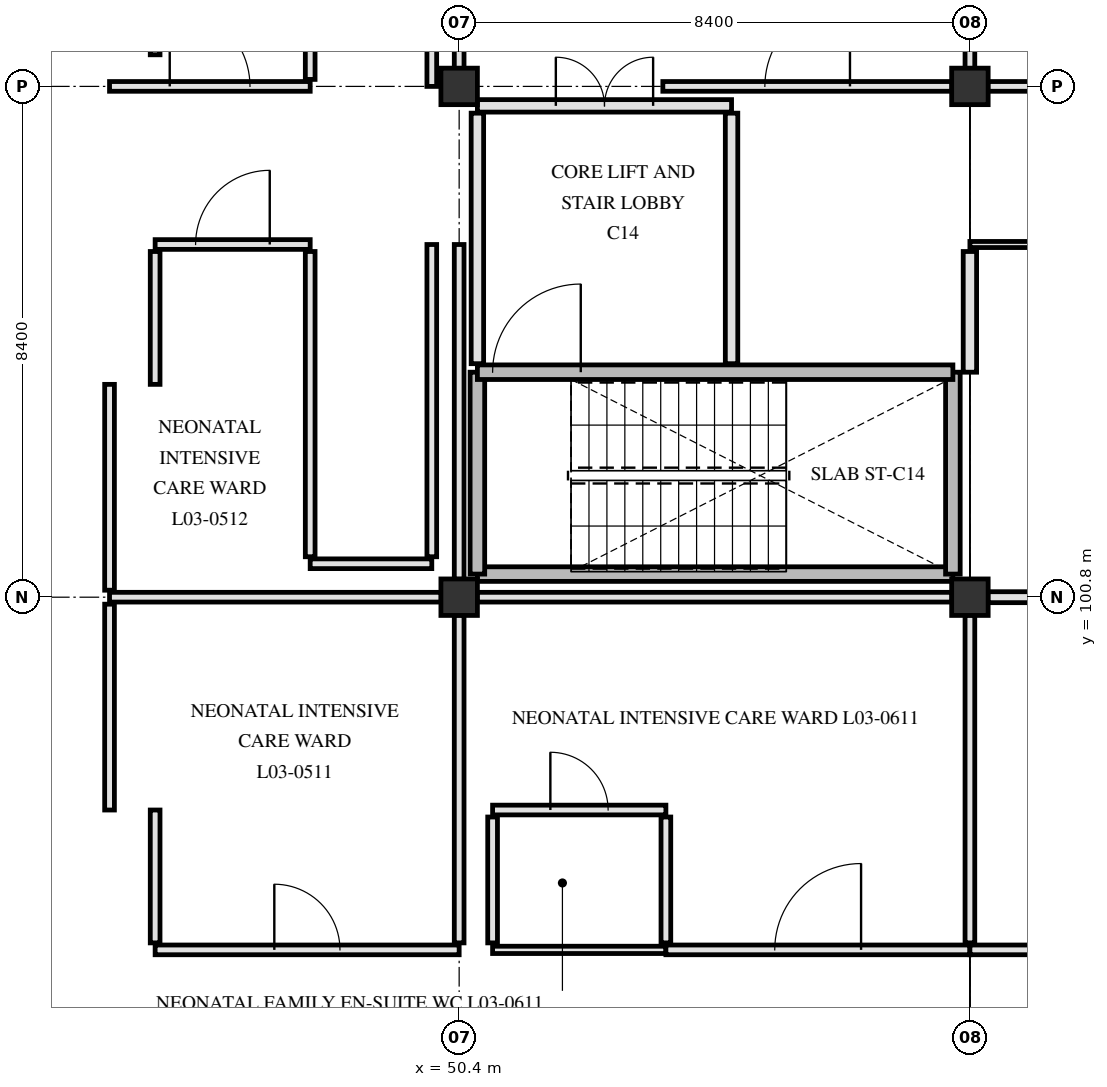
"""IFC4 building model, lengths in metres.
Left out: names, types, materials, properties, quantities, classifications, styles, units other than length and angle.
Written with IfcOpenShell. Run it as: python <this file> out.ifc"""

import sys

from ifc_helpers import new_model, si_unit, direction, frame, frame_2d, origin, origin_2d, place, context, subcontext, project, spatial, rectangle, extrude, element, fill, save


model = new_model("IFC4")
c1 = context("Model", 3, precision=1e-05, world=origin(), true_north=direction((0.0, 1.0)))
c2 = subcontext(c1, "Body", "Model", "MODEL_VIEW")
j1 = project(units=[si_unit("LENGTHUNIT", "METRE"), si_unit("PLANEANGLEUNIT", "RADIAN")], contexts=[c1])
p1 = place(None, origin())
s1 = spatial("IfcSite", under=j1, at=p1, CompositionType="ELEMENT")
p2 = place(p1, origin())
s2 = spatial("IfcBuilding", under=s1, at=p2, CompositionType="ELEMENT")
p3 = place(p2, frame((0.0, 0.0, 14.4)))
s3 = spatial("IfcBuildingStorey", under=s2, at=p3, CompositionType="ELEMENT", Elevation=14.4)
for number, where, z_axis, x_axis in (
    (1, (50.4, 100.8, 0.0), (0.0, 0.0, 1.0), (1.0, 0.0, 0.0)),
    (2, (50.4, 109.2, 0.0), (0.0, 0.0, 1.0), (1.0, 0.0, 0.0)),
    (3, (58.8, 100.8, 0.0), (0.0, 0.0, 1.0), (1.0, 0.0, 0.0)),
    (4, (58.8, 109.2, 0.0), (0.0, 0.0, 1.0), (1.0, 0.0, 0.0)),
):
    element("IfcColumn", number, at=place(p3, frame(where, z_axis=z_axis, x_axis=x_axis)), inside=s3, PredefinedType="COLUMN", context=c2, shape_type="SweptSolid", body=[
        extrude(rectangle(XDim=0.6, YDim=0.6, at=origin_2d()), origin(), (0.0, 0.0, 1.0), 4.2),
    ])
p4 = place(p3, frame((50.7, 101.18, 0.0), z_axis=(0.0, 0.0, 1.0), x_axis=(1.0, 0.0, 0.0)))
e5 = element("IfcWall", 5, at=p4, inside=s3, PredefinedType="SHEAR", context=c2, shape_type="SweptSolid", body=[
    extrude(rectangle(XDim=7.82, YDim=0.24, at=frame_2d((3.91, 0.0))), origin(), (0.0, 0.0, 1.0), 3.9),
])
for number, where, z_axis, x_axis in (
    (6, (50.7, 101.18, 0.0), (0.0, 0.0, 1.0), (0.0, 1.0, 0.0)),
    (7, (58.52, 101.18, 0.0), (0.0, 0.0, 1.0), (0.0, 1.0, 0.0)),
):
    element("IfcWall", number, at=place(p3, frame(where, z_axis=z_axis, x_axis=x_axis)), inside=s3, PredefinedType="SHEAR", context=c2, shape_type="SweptSolid", body=[
        extrude(rectangle(XDim=3.32, YDim=0.24, at=frame_2d((1.66, 0.0))), origin(), (0.0, 0.0, 1.0), 3.9),
    ])
p5 = place(p3, frame((50.7, 104.5, 0.0), z_axis=(0.0, 0.0, 1.0), x_axis=(1.0, 0.0, 0.0)))
e8 = element("IfcWall", 8, at=p5, inside=s3, PredefinedType="SHEAR", context=c2, shape_type="SweptSolid", body=[
    extrude(rectangle(XDim=7.82, YDim=0.24, at=frame_2d((3.91, 0.0))), origin(), (0.0, 0.0, 1.0), 3.9),
])
p6 = place(p5, frame((0.25, 0.0, 0.0)))
e9 = element("IfcOpeningElement", 9, at=p6, cuts=e8, PredefinedType="OPENING", context=c2, shape_type="SweptSolid", body=[
    extrude(rectangle(XDim=1.45, YDim=2.2, at=frame_2d((0.725, 1.1))), frame((0.0, 0.13, 0.0), z_axis=(0.0, -1.0, 0.0), x_axis=(1.0, 0.0, 0.0)), (0.0, 0.0, 1.0), 0.26),
])
p7 = place(p3, frame((54.88, 104.64, 0.0), z_axis=(0.0, 0.0, 1.0), x_axis=(0.0, 1.0, 0.0)))
e10 = element("IfcWall", 10, at=p7, inside=s3, PredefinedType="PARTITIONING", context=c2, shape_type="SweptSolid", body=[
    extrude(rectangle(XDim=4.12, YDim=0.205, at=frame_2d((2.06, 0.0))), origin(), (0.0, 0.0, 1.0), 3.89),
])
p8 = place(p3, frame((50.7, 104.64, 0.0), z_axis=(0.0, 0.0, 1.0), x_axis=(0.0, 1.0, 0.0)))
e11 = element("IfcWall", 11, at=p8, inside=s3, PredefinedType="PARTITIONING", context=c2, shape_type="SweptSolid", body=[
    extrude(rectangle(XDim=4.12, YDim=0.205, at=frame_2d((2.06, 0.0))), origin(), (0.0, 0.0, 1.0), 2.89),
])
p9 = place(p3, frame((50.7, 108.88, 0.0), z_axis=(0.0, 0.0, 1.0), x_axis=(1.0, 0.0, 0.0)))
e12 = element("IfcWall", 12, at=p9, inside=s3, PredefinedType="PARTITIONING", context=c2, shape_type="SweptSolid", body=[
    extrude(rectangle(XDim=4.18, YDim=0.205, at=frame_2d((2.09, 0.0))), origin(), (0.0, 0.0, 1.0), 2.89),
])
p10 = place(p9, frame((1.29, 0.0, 0.0)))
e13 = element("IfcOpeningElement", 13, at=p10, cuts=e12, PredefinedType="OPENING", context=c2, shape_type="SweptSolid", body=[
    extrude(rectangle(XDim=1.6, YDim=2.25, at=frame_2d((0.8, 1.125))), frame((0.0, 0.113, 0.0), z_axis=(0.0, -1.0, 0.0), x_axis=(1.0, 0.0, 0.0)), (0.0, 0.0, 1.0), 0.225),
])
p11 = place(p3, frame((45.4, 95.0, 0.0), z_axis=(0.0, 0.0, 1.0), x_axis=(1.0, 0.0, 0.0)))
e14 = element("IfcWall", 14, at=p11, inside=s3, PredefinedType="PARTITIONING", context=c2, shape_type="SweptSolid", body=[
    extrude(rectangle(XDim=5.0, YDim=0.16, at=frame_2d((2.5, 0.0))), origin(), (0.0, 0.0, 1.0), 2.89),
])
p12 = place(p11, frame((1.96, 0.0, 0.0)))
e15 = element("IfcOpeningElement", 15, at=p12, cuts=e14, PredefinedType="OPENING", context=c2, shape_type="SweptSolid", body=[
    extrude(rectangle(XDim=1.08, YDim=2.12, at=frame_2d((0.54, 1.06))), frame((0.0, 0.09, 0.0), z_axis=(0.0, -1.0, 0.0), x_axis=(1.0, 0.0, 0.0)), (0.0, 0.0, 1.0), 0.18),
])
p13 = place(p3, frame((50.95, 95.0, 0.0), z_axis=(0.0, 0.0, 1.0), x_axis=(1.0, 0.0, 0.0)))
e16 = element("IfcWall", 16, at=p13, inside=s3, PredefinedType="PARTITIONING", context=c2, shape_type="SweptSolid", body=[
    extrude(rectangle(XDim=2.85, YDim=0.12, at=frame_2d((1.425, 0.0))), origin(), (0.0, 0.0, 1.0), 3.89),
])
p14 = place(p3, frame((53.8, 95.0, 0.0), z_axis=(0.0, 0.0, 1.0), x_axis=(1.0, 0.0, 0.0)))
e17 = element("IfcWall", 17, at=p14, inside=s3, PredefinedType="PARTITIONING", context=c2, shape_type="SweptSolid", body=[
    extrude(rectangle(XDim=5.0, YDim=0.16, at=frame_2d((2.5, 0.0))), origin(), (0.0, 0.0, 1.0), 3.34),
])
p15 = place(p14, frame((1.79, 0.0, 0.0)))
e18 = element("IfcOpeningElement", 18, at=p15, cuts=e17, PredefinedType="OPENING", context=c2, shape_type="SweptSolid", body=[
    extrude(rectangle(XDim=1.42, YDim=2.22, at=frame_2d((0.71, 1.11))), frame((0.0, 0.09, 0.0), z_axis=(0.0, -1.0, 0.0), x_axis=(1.0, 0.0, 0.0)), (0.0, 0.0, 1.0), 0.18),
])
p16 = place(p3, frame((58.8, 95.0, 0.0), z_axis=(0.0, 0.0, 1.0), x_axis=(1.0, 0.0, 0.0)))
e19 = element("IfcWall", 19, at=p16, inside=s3, PredefinedType="PARTITIONING", context=c2, shape_type="SweptSolid", body=[
    extrude(rectangle(XDim=8.4, YDim=0.16, at=frame_2d((4.2, 0.0))), origin(), (0.0, 0.0, 1.0), 3.34),
])
p17 = place(p16, frame((3.25, 0.0, 0.0)))
e20 = element("IfcOpeningElement", 20, at=p17, cuts=e19, PredefinedType="OPENING", context=c2, shape_type="SweptSolid", body=[
    extrude(rectangle(XDim=1.9, YDim=2.3, at=frame_2d((0.95, 1.15))), frame((0.0, 0.09, 0.0), z_axis=(0.0, -1.0, 0.0), x_axis=(1.0, 0.0, 0.0)), (0.0, 0.0, 1.0), 0.18),
])
p18 = place(p3, frame((50.95, 97.3, 0.0), z_axis=(0.0, 0.0, 1.0), x_axis=(1.0, 0.0, 0.0)))
e21 = element("IfcWall", 21, at=p18, inside=s3, PredefinedType="PARTITIONING", context=c2, shape_type="SweptSolid", body=[
    extrude(rectangle(XDim=2.85, YDim=0.16, at=frame_2d((1.425, 0.0))), origin(), (0.0, 0.0, 1.0), 3.89),
])
p19 = place(p18, frame((0.95, 0.0, 0.0)))
e22 = element("IfcOpeningElement", 22, at=p19, cuts=e21, PredefinedType="OPENING", context=c2, shape_type="SweptSolid", body=[
    extrude(rectangle(XDim=0.95, YDim=2.1, at=frame_2d((0.475, 1.05))), frame((0.0, 0.09, 0.0), z_axis=(0.0, -1.0, 0.0), x_axis=(1.0, 0.0, 0.0)), (0.0, 0.0, 1.0), 0.18),
])
p20 = place(p3, frame((44.65, 100.8, 0.0), z_axis=(0.0, 0.0, 1.0), x_axis=(1.0, 0.0, 0.0)))
e23 = element("IfcWall", 23, at=p20, inside=s3, PredefinedType="PARTITIONING", context=c2, shape_type="SweptSolid", body=[
    extrude(rectangle(XDim=5.455, YDim=0.16, at=frame_2d((2.728, 0.0))), origin(), (0.0, 0.0, 1.0), 3.29),
])
p21 = place(p3, frame((50.695, 100.8, 0.0), z_axis=(0.0, 0.0, 1.0), x_axis=(1.0, 0.0, 0.0)))
e24 = element("IfcWall", 24, at=p21, inside=s3, PredefinedType="PARTITIONING", context=c2, shape_type="SweptSolid", body=[
    extrude(rectangle(XDim=7.81, YDim=0.16, at=frame_2d((3.905, 0.0))), origin(), (0.0, 0.0, 1.0), 3.29),
])
p22 = place(p3, frame((59.095, 100.8, 0.0), z_axis=(0.0, 0.0, 1.0), x_axis=(1.0, 0.0, 0.0)))
e25 = element("IfcWall", 25, at=p22, inside=s3, PredefinedType="PARTITIONING", context=c2, shape_type="SweptSolid", body=[
    extrude(rectangle(XDim=7.76, YDim=0.18, at=frame_2d((3.88, 0.0))), origin(), (0.0, 0.0, 1.0), 3.29),
])
p23 = place(p3, frame((47.95, 101.35, 0.0), z_axis=(0.0, 0.0, 1.0), x_axis=(1.0, 0.0, 0.0)))
e26 = element("IfcWall", 26, at=p23, inside=s3, PredefinedType="PARTITIONING", context=c2, shape_type="SweptSolid", body=[
    extrude(rectangle(XDim=2.0, YDim=0.16, at=frame_2d((1.0, 0.0))), origin(), (0.0, 0.0, 1.0), 3.89),
])
p24 = place(p3, frame((45.4, 106.6, 0.0), z_axis=(0.0, 0.0, 1.0), x_axis=(1.0, 0.0, 0.0)))
e27 = element("IfcWall", 27, at=p24, inside=s3, PredefinedType="PARTITIONING", context=c2, shape_type="SweptSolid", body=[
    extrude(rectangle(XDim=2.55, YDim=0.16, at=frame_2d((1.275, 0.0))), origin(), (0.0, 0.0, 1.0), 3.89),
])
p25 = place(p24, frame((0.665, 0.0, 0.0)))
e28 = element("IfcOpeningElement", 28, at=p25, cuts=e27, PredefinedType="OPENING", context=c2, shape_type="SweptSolid", body=[
    extrude(rectangle(XDim=1.22, YDim=2.18, at=frame_2d((0.61, 1.09))), frame((0.0, 0.09, 0.0), z_axis=(0.0, -1.0, 0.0), x_axis=(1.0, 0.0, 0.0)), (0.0, 0.0, 1.0), 0.18),
])
p26 = place(p3, frame((58.8, 106.6, 0.0), z_axis=(0.0, 0.0, 1.0), x_axis=(1.0, 0.0, 0.0)))
e29 = element("IfcWall", 29, at=p26, inside=s3, PredefinedType="PARTITIONING", context=c2, shape_type="SweptSolid", body=[
    extrude(rectangle(XDim=8.4, YDim=0.1, at=frame_2d((4.2, 0.0))), origin(), (0.0, 0.0, 1.0), 3.34),
])
p27 = place(p26, frame((3.35, 0.0, 0.0)))
e30 = element("IfcOpeningElement", 30, at=p27, cuts=e29, PredefinedType="OPENING", context=c2, shape_type="SweptSolid", body=[
    extrude(rectangle(XDim=1.7, YDim=2.25, at=frame_2d((0.85, 1.125))), frame((0.0, 0.06, 0.0), z_axis=(0.0, -1.0, 0.0), x_axis=(1.0, 0.0, 0.0)), (0.0, 0.0, 1.0), 0.12),
])
p28 = place(p3, frame((44.65, 109.2, 0.0), z_axis=(0.0, 0.0, 1.0), x_axis=(1.0, 0.0, 0.0)))
e31 = element("IfcWall", 31, at=p28, inside=s3, PredefinedType="PARTITIONING", context=c2, shape_type="SweptSolid", body=[
    extrude(rectangle(XDim=3.3, YDim=0.16, at=frame_2d((1.65, 0.0))), origin(), (0.0, 0.0, 1.0), 3.29),
])
p29 = place(p28, frame((0.99, 0.0, 0.0)))
e32 = element("IfcOpeningElement", 32, at=p29, cuts=e31, PredefinedType="OPENING", context=c2, shape_type="SweptSolid", body=[
    extrude(rectangle(XDim=1.32, YDim=2.18, at=frame_2d((0.66, 1.09))), frame((0.0, 0.09, 0.0), z_axis=(0.0, -1.0, 0.0), x_axis=(1.0, 0.0, 0.0)), (0.0, 0.0, 1.0), 0.18),
])
p30 = place(p3, frame((53.75, 109.2, 0.0), z_axis=(0.0, 0.0, 1.0), x_axis=(1.0, 0.0, 0.0)))
e33 = element("IfcWall", 33, at=p30, inside=s3, PredefinedType="PARTITIONING", context=c2, shape_type="SweptSolid", body=[
    extrude(rectangle(XDim=4.755, YDim=0.16, at=frame_2d((2.377, 0.0))), origin(), (0.0, 0.0, 1.0), 3.29),
])
p31 = place(p30, frame((1.677, 0.0, 0.0)))
e34 = element("IfcOpeningElement", 34, at=p31, cuts=e33, PredefinedType="OPENING", context=c2, shape_type="SweptSolid", body=[
    extrude(rectangle(XDim=1.4, YDim=2.2, at=frame_2d((0.7, 1.1))), frame((0.0, 0.09, 0.0), z_axis=(0.0, -1.0, 0.0), x_axis=(1.0, 0.0, 0.0)), (0.0, 0.0, 1.0), 0.18),
])
p32 = place(p3, frame((59.095, 109.2, 0.0), z_axis=(0.0, 0.0, 1.0), x_axis=(1.0, 0.0, 0.0)))
e35 = element("IfcWall", 35, at=p32, inside=s3, PredefinedType="PARTITIONING", context=c2, shape_type="SweptSolid", body=[
    extrude(rectangle(XDim=7.76, YDim=0.16, at=frame_2d((3.88, 0.0))), origin(), (0.0, 0.0, 1.0), 3.29),
])
p33 = place(p32, frame((3.38, 0.0, 0.0)))
e36 = element("IfcOpeningElement", 36, at=p33, cuts=e35, PredefinedType="OPENING", context=c2, shape_type="SweptSolid", body=[
    extrude(rectangle(XDim=1.0, YDim=2.15, at=frame_2d((0.5, 1.075))), frame((0.0, 0.09, 0.0), z_axis=(0.0, -1.0, 0.0), x_axis=(1.0, 0.0, 0.0)), (0.0, 0.0, 1.0), 0.18),
])
for number, where, z_axis, x_axis in (
    (37, (44.65, 97.3, 0.0), (0.0, 0.0, 1.0), (0.0, 1.0, 0.0)),
    (38, (44.65, 100.915, 0.0), (0.0, 0.0, 1.0), (0.0, 1.0, 0.0)),
):
    element("IfcWall", number, at=place(p3, frame(where, z_axis=z_axis, x_axis=x_axis)), inside=s3, PredefinedType="PARTITIONING", context=c2, shape_type="SweptSolid", body=[
        extrude(rectangle(XDim=3.385, YDim=0.16, at=frame_2d((1.692, 0.0))), origin(), (0.0, 0.0, 1.0), 3.29),
    ])
for number, where, z_axis, x_axis in (
    (39, (45.4, 95.115, 0.0), (0.0, 0.0, 1.0), (0.0, 1.0, 0.0)),
    (40, (45.4, 104.3, 0.0), (0.0, 0.0, 1.0), (0.0, 1.0, 0.0)),
):
    element("IfcWall", number, at=place(p3, frame(where, z_axis=z_axis, x_axis=x_axis)), inside=s3, PredefinedType="PARTITIONING", context=c2, shape_type="SweptSolid", body=[
        extrude(rectangle(XDim=2.185, YDim=0.16, at=frame_2d((1.093, 0.0))), origin(), (0.0, 0.0, 1.0), 3.89),
    ])
p34 = place(p3, frame((45.4, 109.72, 0.0), z_axis=(0.0, 0.0, 1.0), x_axis=(0.0, 1.0, 0.0)))
e41 = element("IfcWall", 41, at=p34, inside=s3, PredefinedType="PARTITIONING", context=c2, shape_type="SweptSolid", body=[
    extrude(rectangle(XDim=2.45, YDim=0.16, at=frame_2d((1.225, 0.0))), origin(), (0.0, 0.0, 1.0), 3.89),
])
p35 = place(p3, frame((47.95, 101.465, 0.0), z_axis=(0.0, 0.0, 1.0), x_axis=(0.0, 1.0, 0.0)))
e42 = element("IfcWall", 42, at=p35, inside=s3, PredefinedType="PARTITIONING", context=c2, shape_type="SweptSolid", body=[
    extrude(rectangle(XDim=5.02, YDim=0.16, at=frame_2d((2.51, 0.0))), origin(), (0.0, 0.0, 1.0), 3.89),
])
p36 = place(p3, frame((47.95, 109.315, 0.0), z_axis=(0.0, 0.0, 1.0), x_axis=(0.0, 1.0, 0.0)))
e43 = element("IfcWall", 43, at=p36, inside=s3, PredefinedType="PARTITIONING", context=c2, shape_type="SweptSolid", body=[
    extrude(rectangle(XDim=2.22, YDim=0.16, at=frame_2d((1.11, 0.0))), origin(), (0.0, 0.0, 1.0), 3.29),
])
p37 = place(p3, frame((49.95, 101.465, 0.0), z_axis=(0.0, 0.0, 1.0), x_axis=(0.0, 1.0, 0.0)))
e44 = element("IfcWall", 44, at=p37, inside=s3, PredefinedType="PARTITIONING", context=c2, shape_type="SweptSolid", body=[
    extrude(rectangle(XDim=5.135, YDim=0.16, at=frame_2d((2.567, 0.0))), origin(), (0.0, 0.0, 1.0), 3.89),
])
p38 = place(p3, frame((49.95, 109.2, 0.0), z_axis=(0.0, 0.0, 1.0), x_axis=(0.0, 1.0, 0.0)))
e45 = element("IfcWall", 45, at=p38, inside=s3, PredefinedType="PARTITIONING", context=c2, shape_type="SweptSolid", body=[
    extrude(rectangle(XDim=2.335, YDim=0.16, at=frame_2d((1.167, 0.0))), origin(), (0.0, 0.0, 1.0), 3.29),
])
p39 = place(p3, frame((50.4, 95.115, 0.0), z_axis=(0.0, 0.0, 1.0), x_axis=(0.0, 1.0, 0.0)))
e46 = element("IfcWall", 46, at=p39, inside=s3, PredefinedType="PARTITIONING", context=c2, shape_type="SweptSolid", body=[
    extrude(rectangle(XDim=5.39, YDim=0.16, at=frame_2d((2.695, 0.0))), origin(), (0.0, 0.0, 1.0), 2.89),
])
p40 = place(p3, frame((50.4, 101.095, 0.0), z_axis=(0.0, 0.0, 1.0), x_axis=(0.0, 1.0, 0.0)))
e47 = element("IfcWall", 47, at=p40, inside=s3, PredefinedType="PARTITIONING", context=c2, shape_type="SweptSolid", body=[
    extrude(rectangle(XDim=5.505, YDim=0.16, at=frame_2d((2.752, 0.0))), origin(), (0.0, 0.0, 1.0), 2.89),
])
p41 = place(p3, frame((50.4, 109.495, 0.0), z_axis=(0.0, 0.0, 1.0), x_axis=(0.0, 1.0, 0.0)))
e48 = element("IfcWall", 48, at=p41, inside=s3, PredefinedType="PARTITIONING", context=c2, shape_type="SweptSolid", body=[
    extrude(rectangle(XDim=7.81, YDim=0.16, at=frame_2d((3.905, 0.0))), origin(), (0.0, 0.0, 1.0), 2.89),
])
for number, where, z_axis, x_axis in (
    (49, (50.95, 95.115, 0.0), (0.0, 0.0, 1.0), (0.0, 1.0, 0.0)),
    (50, (53.8, 95.115, 0.0), (0.0, 0.0, 1.0), (0.0, 1.0, 0.0)),
):
    element("IfcWall", number, at=place(p3, frame(where, z_axis=z_axis, x_axis=x_axis)), inside=s3, PredefinedType="PARTITIONING", context=c2, shape_type="SweptSolid", body=[
        extrude(rectangle(XDim=2.07, YDim=0.16, at=frame_2d((1.035, 0.0))), origin(), (0.0, 0.0, 1.0), 3.89),
    ])
p42 = place(p3, frame((58.8, 95.115, 0.0), z_axis=(0.0, 0.0, 1.0), x_axis=(0.0, 1.0, 0.0)))
e51 = element("IfcWall", 51, at=p42, inside=s3, PredefinedType="PARTITIONING", context=c2, shape_type="SweptSolid", body=[
    extrude(rectangle(XDim=5.39, YDim=0.16, at=frame_2d((2.695, 0.0))), origin(), (0.0, 0.0, 1.0), 3.34),
])
p43 = place(p3, frame((58.8, 104.5, 0.0), z_axis=(0.0, 0.0, 1.0), x_axis=(0.0, 1.0, 0.0)))
e52 = element("IfcWall", 52, at=p43, inside=s3, PredefinedType="PARTITIONING", context=c2, shape_type="SweptSolid", body=[
    extrude(rectangle(XDim=1.985, YDim=0.22, at=frame_2d((0.993, 0.0))), origin(), (0.0, 0.0, 1.0), 3.34),
])
p44 = place(p3, frame((58.8, 109.495, 0.0), z_axis=(0.0, 0.0, 1.0), x_axis=(0.0, 1.0, 0.0)))
e53 = element("IfcWall", 53, at=p44, inside=s3, PredefinedType="PARTITIONING", context=c2, shape_type="SweptSolid", body=[
    extrude(rectangle(XDim=7.735, YDim=0.16, at=frame_2d((3.867, 0.0))), origin(), (0.0, 0.0, 1.0), 3.34),
])
p45 = place(p6, origin())
e54 = element("IfcDoor", 54, at=p45, inside=s3, OperationType="SINGLE_SWING_RIGHT", PredefinedType="DOOR", context=c2, shape_type="SweptSolid", body=[
    extrude(rectangle(XDim=1.45, YDim=2.2, at=frame_2d((0.725, 1.1))), frame((0.0, 0.025, 0.0), z_axis=(0.0, -1.0, 0.0), x_axis=(1.0, 0.0, 0.0)), (0.0, 0.0, 1.0), 0.05),
])
fill(e9, e54)
p46 = place(p10, origin())
e55 = element("IfcDoor", 55, at=p46, inside=s3, OperationType="DOUBLE_SWING_LEFT", PredefinedType="DOOR", context=c2, shape_type="SweptSolid", body=[
    extrude(rectangle(XDim=1.6, YDim=2.25, at=frame_2d((0.8, 1.125))), frame((0.0, 0.025, 0.0), z_axis=(0.0, -1.0, 0.0), x_axis=(1.0, 0.0, 0.0)), (0.0, 0.0, 1.0), 0.05),
])
fill(e13, e55)
p47 = place(p12, origin())
e56 = element("IfcDoor", 56, at=p47, inside=s3, OperationType="SINGLE_SWING_LEFT", PredefinedType="DOOR", context=c2, shape_type="SweptSolid", body=[
    extrude(rectangle(XDim=1.08, YDim=2.12, at=frame_2d((0.54, 1.06))), frame((0.0, 0.025, 0.0), z_axis=(0.0, -1.0, 0.0), x_axis=(1.0, 0.0, 0.0)), (0.0, 0.0, 1.0), 0.05),
])
fill(e15, e56)
p48 = place(p25, origin())
e57 = element("IfcDoor", 57, at=p48, inside=s3, OperationType="SINGLE_SWING_RIGHT", PredefinedType="DOOR", context=c2, shape_type="SweptSolid", body=[
    extrude(rectangle(XDim=1.22, YDim=2.18, at=frame_2d((0.61, 1.09))), frame((0.0, 0.025, 0.0), z_axis=(0.0, -1.0, 0.0), x_axis=(1.0, 0.0, 0.0)), (0.0, 0.0, 1.0), 0.05),
])
fill(e28, e57)
p49 = place(p29, origin())
e58 = element("IfcDoor", 58, at=p49, inside=s3, OperationType="SINGLE_SWING_LEFT", PredefinedType="DOOR", context=c2, shape_type="SweptSolid", body=[
    extrude(rectangle(XDim=1.32, YDim=2.18, at=frame_2d((0.66, 1.09))), frame((0.0, 0.025, 0.0), z_axis=(0.0, -1.0, 0.0), x_axis=(1.0, 0.0, 0.0)), (0.0, 0.0, 1.0), 0.05),
])
fill(e32, e58)
p50 = place(p15, origin())
e59 = element("IfcDoor", 59, at=p50, inside=s3, OperationType="SINGLE_SWING_RIGHT", PredefinedType="DOOR", context=c2, shape_type="SweptSolid", body=[
    extrude(rectangle(XDim=1.42, YDim=2.22, at=frame_2d((0.71, 1.11))), frame((0.0, 0.025, 0.0), z_axis=(0.0, -1.0, 0.0), x_axis=(1.0, 0.0, 0.0)), (0.0, 0.0, 1.0), 0.05),
])
fill(e18, e59)
p51 = place(p19, origin())
e60 = element("IfcDoor", 60, at=p51, inside=s3, OperationType="SINGLE_SWING_LEFT", PredefinedType="DOOR", context=c2, shape_type="SweptSolid", body=[
    extrude(rectangle(XDim=0.95, YDim=2.1, at=frame_2d((0.475, 1.05))), frame((0.0, 0.025, 0.0), z_axis=(0.0, -1.0, 0.0), x_axis=(1.0, 0.0, 0.0)), (0.0, 0.0, 1.0), 0.05),
])
fill(e22, e60)
p52 = place(p31, origin())
e61 = element("IfcDoor", 61, at=p52, inside=s3, OperationType="SINGLE_SWING_RIGHT", PredefinedType="DOOR", context=c2, shape_type="SweptSolid", body=[
    extrude(rectangle(XDim=1.4, YDim=2.2, at=frame_2d((0.7, 1.1))), frame((0.0, 0.025, 0.0), z_axis=(0.0, -1.0, 0.0), x_axis=(1.0, 0.0, 0.0)), (0.0, 0.0, 1.0), 0.05),
])
fill(e34, e61)
save(model, sys.argv[1])
